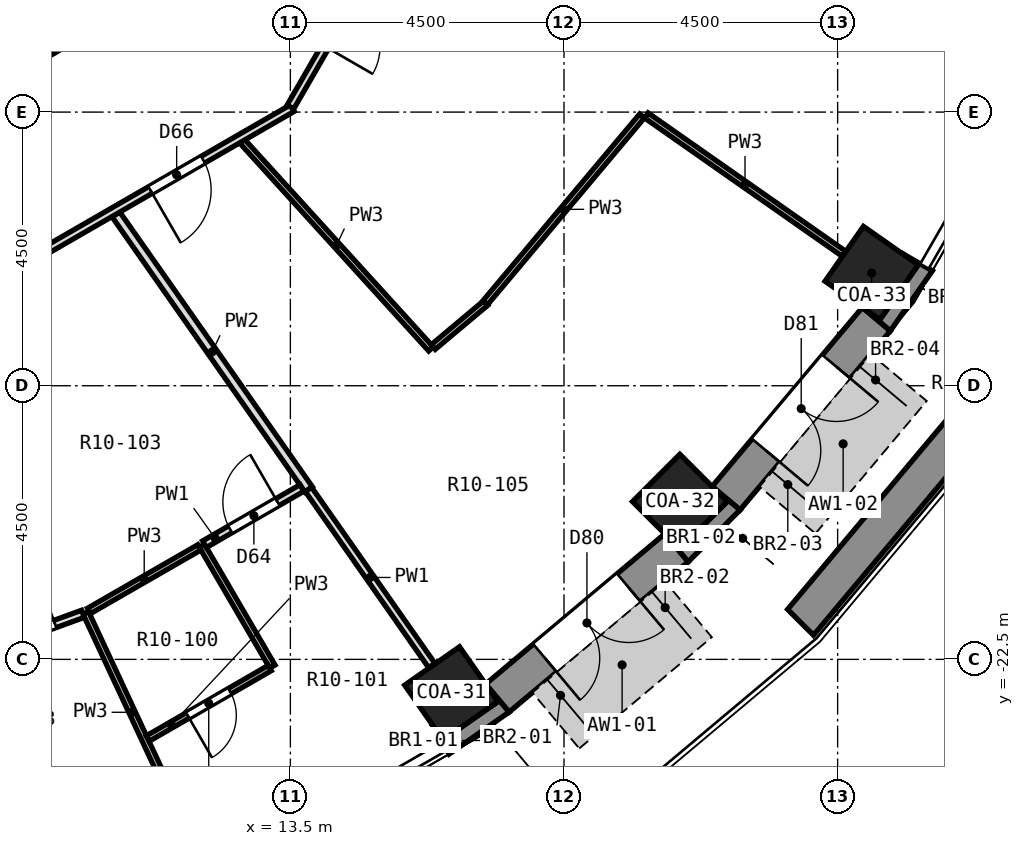
"""IFC4 building model, lengths in metres.
Left out: names, types, materials, properties, quantities, classifications, styles, units other than length and angle.
Written with IfcOpenShell. Run it as: python <this file> out.ifc"""

import sys

from ifc_helpers import new_model, si_unit, direction, frame, frame_2d, origin, origin_2d, place, context, subcontext, project, spatial, polyline, rectangle, outline, extrude, element, fill, save


model = new_model("IFC4")
c1 = context("Model", 3, precision=1e-05, world=origin(), true_north=direction((0.0, 1.0)))
c2 = subcontext(c1, "Body", "Model", "MODEL_VIEW")
j1 = project(units=[si_unit("LENGTHUNIT", "METRE"), si_unit("PLANEANGLEUNIT", "RADIAN")], contexts=[c1])
p1 = place(None, origin())
s1 = spatial("IfcSite", under=j1, at=p1, CompositionType="ELEMENT")
p2 = place(p1, origin())
s2 = spatial("IfcBuilding", under=s1, at=p2, CompositionType="ELEMENT")
p3 = place(p2, frame((0.0, 0.0, 36.2)))
s3 = spatial("IfcBuildingStorey", under=s2, at=p3, CompositionType="ELEMENT", Elevation=36.2)
for number, where, z_axis, x_axis in (
    (1, (16.146, -23.059, 0.0), (0.0, 0.0, 1.0), (0.574, -0.819, 0.0)),
    (2, (19.905, -19.905, 0.0), (0.0, 0.0, 1.0), (0.707, -0.707, 0.0)),
    (3, (23.059, -16.146, 0.0), (0.0, 0.0, 1.0), (0.819, -0.574, 0.0)),
):
    element("IfcColumn", number, at=place(p3, frame(where, z_axis=z_axis, x_axis=x_axis)), inside=s3, PredefinedType="COLUMN", context=c2, shape_type="SweptSolid", body=[
        extrude(rectangle(XDim=1.1, YDim=1.1, at=origin_2d()), origin(), (0.0, 0.0, 1.0), 3.3),
    ])
p4 = place(p3, frame((16.904, -23.137, 0.0), z_axis=(0.0, 0.0, 1.0), x_axis=(0.766026164483, 0.642809392687, 0.0)))
e4 = element("IfcWall", 4, at=p4, inside=s3, PredefinedType="SOLIDWALL", context=c2, shape_type="SweptSolid", body=[
    extrude(rectangle(XDim=3.846, YDim=0.6, at=frame_2d((1.923, 0.0))), origin(), (0.0, 0.0, 1.0), 2.75),
])
p5 = place(p4, frame((1.023, 0.0, 0.0)))
e5 = element("IfcOpeningElement", 5, at=p5, cuts=e4, PredefinedType="OPENING", context=c2, shape_type="SweptSolid", body=[
    extrude(rectangle(XDim=1.8, YDim=2.4, at=frame_2d((0.9, 1.2))), frame((0.0, 0.312, 0.0), z_axis=(0.0, -1.0, 0.0), x_axis=(1.0, 0.0, 0.0)), (0.0, 0.0, 1.0), 0.624),
])
p6 = place(p3, frame((20.665, -19.85, 0.0), z_axis=(0.0, 0.0, 1.0), x_axis=(0.642809392687, 0.766026164483, 0.0)))
e6 = element("IfcWall", 6, at=p6, inside=s3, PredefinedType="SOLIDWALL", context=c2, shape_type="SweptSolid", body=[
    extrude(rectangle(XDim=3.846, YDim=0.6, at=frame_2d((1.923, 0.0))), origin(), (0.0, 0.0, 1.0), 2.75),
])
p7 = place(p6, frame((1.023, 0.0, 0.0)))
e7 = element("IfcOpeningElement", 7, at=p7, cuts=e6, PredefinedType="OPENING", context=c2, shape_type="SweptSolid", body=[
    extrude(rectangle(XDim=1.8, YDim=2.4, at=frame_2d((0.9, 1.2))), frame((0.0, 0.312, 0.0), z_axis=(0.0, -1.0, 0.0), x_axis=(1.0, 0.0, 0.0)), (0.0, 0.0, 1.0), 0.624),
])
p8 = place(p3, origin())
e8 = element("IfcWall", 8, at=p8, inside=s3, PredefinedType="SOLIDWALL", context=c2, shape_type="SweptSolid", body=[
    extrude(outline(polyline([(16.11, -24.058), (17.097, -23.367), (16.711, -22.907), (16.912, -23.194), (16.011, -23.825), (15.81, -23.538), (16.11, -24.058)])), origin(), (0.0, 0.0, 1.0), 2.75),
])
p9 = place(p3, origin())
e9 = element("IfcWall", 9, at=p9, inside=s3, PredefinedType="SOLIDWALL", context=c2, shape_type="SweptSolid", body=[
    extrude(outline(polyline([(20.895, -20.043), (20.435, -19.657), (20.683, -19.905), (19.905, -20.683), (19.657, -20.435), (20.043, -20.895), (20.895, -20.043)])), origin(), (0.0, 0.0, 1.0), 2.75),
])
p10 = place(p3, origin())
e10 = element("IfcWall", 10, at=p10, inside=s3, PredefinedType="SOLIDWALL", context=c2, shape_type="SweptSolid", body=[
    extrude(outline(polyline([(23.367, -17.097), (24.058, -16.11), (23.538, -15.81), (23.825, -16.011), (23.194, -16.912), (22.907, -16.711), (23.367, -17.097)])), origin(), (0.0, 0.0, 1.0), 2.75),
])
p11 = place(p3, origin())
e11 = element("IfcWall", 11, at=p11, inside=s3, PredefinedType="PARAPET", context=c2, shape_type="SweptSolid", body=[
    extrude(outline(polyline([(22.103, -22.103), (25.605, -17.929), (28.33, -13.21), (27.784, -12.956), (25.112, -17.584), (21.677, -21.677), (22.103, -22.103)])), origin(), (0.0, 0.0, 1.0), 0.5),
])
p12 = place(p3, frame((10.135, -21.734, 0.0), z_axis=(0.0, 0.0, 1.0), x_axis=(0.422504004964, -0.906361057079, 0.0)))
e12 = element("IfcWall", 12, at=p12, inside=s3, PredefinedType="PARTITIONING", context=c2, shape_type="SweptSolid", body=[
    extrude(rectangle(XDim=3.609, YDim=0.1, at=frame_2d((1.805, 0.0))), origin(), (0.0, 0.0, 1.0), 2.75),
])
p13 = place(p3, frame((12.045, -20.631, 0.0), z_axis=(0.0, 0.0, 1.0), x_axis=(0.503937015779, -0.863740403204, 0.0)))
e13 = element("IfcWall", 13, at=p13, inside=s3, PredefinedType="PARTITIONING", context=c2, shape_type="SweptSolid", body=[
    extrude(rectangle(XDim=2.3, YDim=0.1, at=frame_2d((1.15, 0.0))), origin(), (0.0, 0.0, 1.0), 2.75),
])
p14 = place(p3, frame((10.63, -15.181, 0.0), z_axis=(0.0, 0.0, 1.0), x_axis=(0.573951755358, -0.818889114912, 0.0)))
e14 = element("IfcWall", 14, at=p14, inside=s3, PredefinedType="PARTITIONING", context=c2, shape_type="SweptSolid", body=[
    extrude(rectangle(XDim=5.523, YDim=0.15, at=frame_2d((2.761, 0.0))), origin(), (0.0, 0.0, 1.0), 2.75),
])
p15 = place(p3, frame((13.798, -19.705, 0.0), z_axis=(0.0, 0.0, 1.0), x_axis=(0.573494797188, -0.819209202584, 0.0)))
e15 = element("IfcWall", 15, at=p15, inside=s3, PredefinedType="PARTITIONING", context=c2, shape_type="SweptSolid", body=[
    extrude(rectangle(XDim=3.534, YDim=0.125, at=frame_2d((1.767, 0.0))), origin(), (0.0, 0.0, 1.0), 2.75),
])
p16 = place(p3, frame((12.708, -13.98, 0.0), z_axis=(0.0, 0.0, 1.0), x_axis=(0.672630660637, -0.739978374259, 0.0)))
e16 = element("IfcWall", 16, at=p16, inside=s3, PredefinedType="PARTITIONING", context=c2, shape_type="SweptSolid", body=[
    extrude(rectangle(XDim=4.615, YDim=0.1, at=frame_2d((2.307, 0.0))), origin(), (0.0, 0.0, 1.0), 2.75),
])
p17 = place(p3, frame((19.355, -13.555, 0.0), z_axis=(0.0, 0.0, 1.0), x_axis=(0.819211647212, -0.573491305141, 0.0)))
e17 = element("IfcWall", 17, at=p17, inside=s3, PredefinedType="PARTITIONING", context=c2, shape_type="SweptSolid", body=[
    extrude(rectangle(XDim=3.96, YDim=0.1, at=frame_2d((1.98, 0.0))), origin(), (0.0, 0.0, 1.0), 2.75),
])
p18 = place(p3, frame((8.326, -22.393, 0.0), z_axis=(0.0, 0.0, 1.0), x_axis=(0.939656514106, 0.342119329325, 0.0)))
e18 = element("IfcWall", 18, at=p18, inside=s3, PredefinedType="PARTITIONING", context=c2, shape_type="SweptSolid", body=[
    extrude(rectangle(XDim=1.875, YDim=0.125, at=frame_2d((0.938, 0.0))), origin(), (0.0, 0.0, 1.0), 2.75),
])
p19 = place(p18, frame((0.488, 0.0, 0.0)))
e19 = element("IfcOpeningElement", 19, at=p19, cuts=e18, PredefinedType="OPENING", context=c2, shape_type="SweptSolid", body=[
    extrude(rectangle(XDim=0.9, YDim=2.1, at=frame_2d((0.45, 1.05))), frame((0.0, 0.074, 0.0), z_axis=(0.0, -1.0, 0.0), x_axis=(1.0, 0.0, 0.0)), (0.0, 0.0, 1.0), 0.149),
])
p20 = place(p3, frame((10.189, -21.703, 0.0), z_axis=(0.0, 0.0, 1.0), x_axis=(0.866587299052, 0.499025503479, 0.0)))
e20 = element("IfcWall", 20, at=p20, inside=s3, PredefinedType="PARTITIONING", context=c2, shape_type="SweptSolid", body=[
    extrude(rectangle(XDim=2.093, YDim=0.1, at=frame_2d((1.046, 0.0))), origin(), (0.0, 0.0, 1.0), 2.75),
])
p21 = place(p3, frame((11.154, -23.802, 0.0), z_axis=(0.0, 0.0, 1.0), x_axis=(0.865918825327, 0.500184553885, 0.0)))
e21 = element("IfcWall", 21, at=p21, inside=s3, PredefinedType="PARTITIONING", context=c2, shape_type="SweptSolid", body=[
    extrude(rectangle(XDim=2.317, YDim=0.1, at=frame_2d((1.158, 0.0))), origin(), (0.0, 0.0, 1.0), 2.75),
])
p22 = place(p21, frame((0.759, 0.0, 0.0)))
e22 = element("IfcOpeningElement", 22, at=p22, cuts=e21, PredefinedType="OPENING", context=c2, shape_type="SweptSolid", body=[
    extrude(rectangle(XDim=0.8, YDim=2.1, at=frame_2d((0.4, 1.05))), frame((0.0, 0.062, 0.0), z_axis=(0.0, -1.0, 0.0), x_axis=(1.0, 0.0, 0.0)), (0.0, 0.0, 1.0), 0.124),
])
p23 = place(p3, frame((12.088, -20.606, 0.0), z_axis=(0.0, 0.0, 1.0), x_axis=(0.866049284889, 0.499958634432, 0.0)))
e23 = element("IfcWall", 23, at=p23, inside=s3, PredefinedType="PARTITIONING", context=c2, shape_type="SweptSolid", body=[
    extrude(rectangle(XDim=1.849, YDim=0.125, at=frame_2d((0.925, 0.0))), origin(), (0.0, 0.0, 1.0), 2.75),
])
p24 = place(p23, frame((0.487, 0.0, 0.0)))
e24 = element("IfcOpeningElement", 24, at=p24, cuts=e23, PredefinedType="OPENING", context=c2, shape_type="SweptSolid", body=[
    extrude(rectangle(XDim=0.9, YDim=2.1, at=frame_2d((0.45, 1.05))), frame((0.0, 0.074, 0.0), z_axis=(0.0, -1.0, 0.0), x_axis=(1.0, 0.0, 0.0)), (0.0, 0.0, 1.0), 0.149),
])
p25 = place(p3, frame((4.984, -18.369, 0.0), z_axis=(0.0, 0.0, 1.0), x_axis=(0.86605048973, 0.49995654735, 0.0)))
e25 = element("IfcWall", 25, at=p25, inside=s3, PredefinedType="PARTITIONING", context=c2, shape_type="SweptSolid", body=[
    extrude(rectangle(XDim=9.871, YDim=0.125, at=frame_2d((4.935, 0.0))), origin(), (0.0, 0.0, 1.0), 2.75),
])
p26 = place(p25, frame((7.174, 0.0, 0.0)))
e26 = element("IfcOpeningElement", 26, at=p26, cuts=e25, PredefinedType="OPENING", context=c2, shape_type="SweptSolid", body=[
    extrude(rectangle(XDim=1.0, YDim=2.1, at=frame_2d((0.5, 1.05))), frame((0.0, 0.074, 0.0), z_axis=(0.0, -1.0, 0.0), x_axis=(1.0, 0.0, 0.0)), (0.0, 0.0, 1.0), 0.149),
])
p27 = place(p3, frame((4.234, -15.569, 0.0), z_axis=(0.0, 0.0, 1.0), x_axis=(0.866028570666, 0.499994514761, 0.0)))
e27 = element("IfcWall", 27, at=p27, inside=s3, PredefinedType="PARTITIONING", context=c2, shape_type="SweptSolid", body=[
    extrude(rectangle(XDim=8.234, YDim=0.125, at=frame_2d((4.117, 0.0))), origin(), (0.0, 0.0, 1.0), 2.75),
])
p28 = place(p27, frame((3.617, 0.0, 0.0)))
e28 = element("IfcOpeningElement", 28, at=p28, cuts=e27, PredefinedType="OPENING", context=c2, shape_type="SweptSolid", body=[
    extrude(rectangle(XDim=1.0, YDim=2.1, at=frame_2d((0.5, 1.05))), frame((0.0, 0.074, 0.0), z_axis=(0.0, -1.0, 0.0), x_axis=(1.0, 0.0, 0.0)), (0.0, 0.0, 1.0), 0.149),
])
p29 = place(p3, frame((15.85, -17.363, 0.0), z_axis=(0.0, 0.0, 1.0), x_axis=(0.766277754486, 0.642509457502, 0.0)))
e29 = element("IfcWall", 29, at=p29, inside=s3, PredefinedType="PARTITIONING", context=c2, shape_type="SweptSolid", body=[
    extrude(rectangle(XDim=1.124, YDim=0.1, at=frame_2d((0.562, 0.0))), origin(), (0.0, 0.0, 1.0), 2.75),
])
p30 = place(p3, frame((16.705, -16.635, 0.0), z_axis=(0.0, 0.0, 1.0), x_axis=(0.642869335103, 0.765975859923, 0.0)))
e30 = element("IfcWall", 30, at=p30, inside=s3, PredefinedType="PARTITIONING", context=c2, shape_type="SweptSolid", body=[
    extrude(rectangle(XDim=4.01, YDim=0.1, at=frame_2d((2.005, 0.0))), origin(), (0.0, 0.0, 1.0), 2.75),
])
p31 = place(p3, frame((13.501, -13.416, 0.0), z_axis=(0.0, 0.0, 1.0), x_axis=(0.499953532967, 0.866052229876, 0.0)))
e31 = element("IfcWall", 31, at=p31, inside=s3, PredefinedType="PARTITIONING", context=c2, shape_type="SweptSolid", body=[
    extrude(rectangle(XDim=3.841, YDim=0.125, at=frame_2d((1.92, 0.0))), origin(), (0.0, 0.0, 1.0), 2.75),
])
p32 = place(p31, frame((1.147, 0.0, 0.0)))
e32 = element("IfcOpeningElement", 32, at=p32, cuts=e31, PredefinedType="OPENING", context=c2, shape_type="SweptSolid", body=[
    extrude(rectangle(XDim=0.9, YDim=2.1, at=frame_2d((0.45, 1.05))), frame((0.0, 0.074, 0.0), z_axis=(0.0, -1.0, 0.0), x_axis=(1.0, 0.0, 0.0)), (0.0, 0.0, 1.0), 0.149),
])
p33 = place(p5, frame((1.8, 0.0, 0.0), z_axis=(0.0, 0.0, 1.0), x_axis=(-1.0, 0.0, 0.0)))
e33 = element("IfcDoor", 33, at=p33, inside=s3, OperationType="DOUBLE_DOOR_SINGLE_SWING", PredefinedType="DOOR", context=c2, shape_type="SweptSolid", body=[
    extrude(rectangle(XDim=1.8, YDim=2.4, at=frame_2d((0.9, 1.2))), frame((0.0, -0.075, 0.0), z_axis=(0.0, -1.0, 0.0), x_axis=(1.0, 0.0, 0.0)), (0.0, 0.0, 1.0), 0.05),
])
fill(e5, e33)
p34 = place(p7, frame((1.8, 0.0, 0.0), z_axis=(0.0, 0.0, 1.0), x_axis=(-1.0, 0.0, 0.0)))
e34 = element("IfcDoor", 34, at=p34, inside=s3, OperationType="DOUBLE_DOOR_SINGLE_SWING", PredefinedType="DOOR", context=c2, shape_type="SweptSolid", body=[
    extrude(rectangle(XDim=1.8, YDim=2.4, at=frame_2d((0.9, 1.2))), frame((0.0, -0.075, 0.0), z_axis=(0.0, -1.0, 0.0), x_axis=(1.0, 0.0, 0.0)), (0.0, 0.0, 1.0), 0.05),
])
fill(e7, e34)
p35 = place(p19, origin())
e35 = element("IfcDoor", 35, at=p35, inside=s3, OperationType="SINGLE_SWING_RIGHT", PredefinedType="DOOR", context=c2, shape_type="SweptSolid", body=[
    extrude(rectangle(XDim=0.9, YDim=2.1, at=frame_2d((0.45, 1.05))), frame((0.0, 0.025, 0.0), z_axis=(0.0, -1.0, 0.0), x_axis=(1.0, 0.0, 0.0)), (0.0, 0.0, 1.0), 0.05),
])
fill(e19, e35)
p36 = place(p22, frame((0.8, 0.0, 0.0), z_axis=(0.0, 0.0, 1.0), x_axis=(-1.0, 0.0, 0.0)))
e36 = element("IfcDoor", 36, at=p36, inside=s3, OperationType="SINGLE_SWING_RIGHT", PredefinedType="DOOR", context=c2, shape_type="SweptSolid", body=[
    extrude(rectangle(XDim=0.8, YDim=2.1, at=frame_2d((0.4, 1.05))), frame((0.0, 0.025, 0.0), z_axis=(0.0, -1.0, 0.0), x_axis=(1.0, 0.0, 0.0)), (0.0, 0.0, 1.0), 0.05),
])
fill(e22, e36)
p37 = place(p24, origin())
e37 = element("IfcDoor", 37, at=p37, inside=s3, OperationType="SINGLE_SWING_RIGHT", PredefinedType="DOOR", context=c2, shape_type="SweptSolid", body=[
    extrude(rectangle(XDim=0.9, YDim=2.1, at=frame_2d((0.45, 1.05))), frame((0.0, 0.025, 0.0), z_axis=(0.0, -1.0, 0.0), x_axis=(1.0, 0.0, 0.0)), (0.0, 0.0, 1.0), 0.05),
])
fill(e24, e37)
p38 = place(p26, frame((1.0, 0.0, 0.0), z_axis=(0.0, 0.0, 1.0), x_axis=(-1.0, 0.0, 0.0)))
e38 = element("IfcDoor", 38, at=p38, inside=s3, OperationType="SINGLE_SWING_RIGHT", PredefinedType="DOOR", context=c2, shape_type="SweptSolid", body=[
    extrude(rectangle(XDim=1.0, YDim=2.1, at=frame_2d((0.5, 1.05))), frame((0.0, 0.025, 0.0), z_axis=(0.0, -1.0, 0.0), x_axis=(1.0, 0.0, 0.0)), (0.0, 0.0, 1.0), 0.05),
])
fill(e26, e38)
save(model, sys.argv[1])
